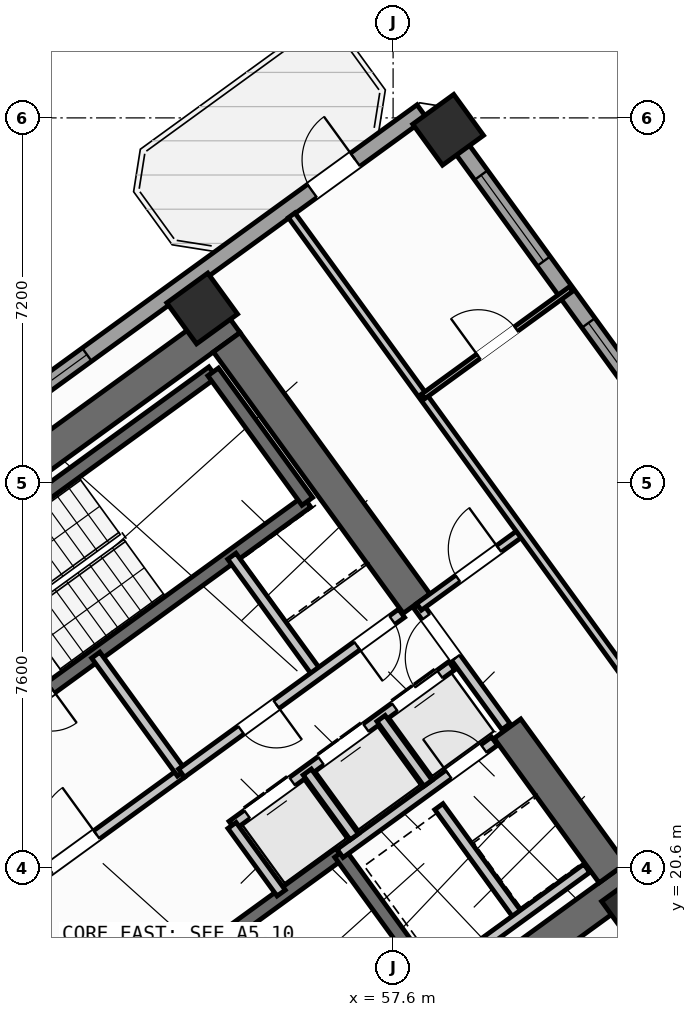
"""IFC4 building model, lengths in metres.
Left out: names, types, materials, properties, quantities, classifications, styles, units other than length and angle.
Written with IfcOpenShell. Run it as: python <this file> out.ifc"""

import sys

from ifc_helpers import new_model, si_unit, direction, frame, frame_2d, origin, origin_2d, place, context, subcontext, project, spatial, rectangle, hollow_rectangle, extrude, source, transform, mapped, element, fill, save


model = new_model("IFC4")
c1 = context("Model", 3, precision=1e-05, world=origin(), true_north=direction((0.0, 1.0)))
c2 = subcontext(c1, "Body", "Model", "MODEL_VIEW")
j1 = project(units=[si_unit("LENGTHUNIT", "METRE"), si_unit("PLANEANGLEUNIT", "RADIAN")], contexts=[c1])
p1 = place(None, origin())
s1 = spatial("IfcSite", under=j1, at=p1, CompositionType="ELEMENT")
p2 = place(p1, origin())
s2 = spatial("IfcBuilding", under=s1, at=p2, CompositionType="ELEMENT")
p3 = place(p2, frame((0.0, 0.0, 49.2)))
s3 = spatial("IfcBuildingStorey", under=s2, at=p3, CompositionType="ELEMENT", Elevation=49.2)
p4 = place(p3, frame((52.318, 13.11, 0.0), z_axis=(0.0, 0.0, 1.0), x_axis=(0.809019445368, 0.587781878776, 0.0)))
e1 = element("IfcWall", 1, at=p4, inside=s3, PredefinedType="SHEAR", context=c2, shape_type="SweptSolid", body=[
    extrude(rectangle(XDim=12.44, YDim=0.65, at=frame_2d((6.22, 0.0))), origin(), (0.0, 0.0, 1.0), 3.35),
])
p5 = place(p3, frame((44.325, 24.113, 0.0), z_axis=(0.0, 0.0, 1.0), x_axis=(0.809012664862, 0.58779121131, 0.0)))
e2 = element("IfcWall", 2, at=p5, inside=s3, PredefinedType="SHEAR", context=c2, shape_type="SweptSolid", body=[
    extrude(rectangle(XDim=12.44, YDim=0.65, at=frame_2d((6.22, 0.0))), origin(), (0.0, 0.0, 1.0), 3.35),
])
p6 = place(p3, frame((61.929, 20.494, 0.0), z_axis=(0.0, 0.0, 1.0), x_axis=(-0.58782982593, 0.808984607855, 0.0)))
e3 = element("IfcWall", 3, at=p6, inside=s3, PredefinedType="SHEAR", context=c2, shape_type="SweptSolid", body=[
    extrude(rectangle(XDim=3.525, YDim=0.65, at=frame_2d((1.762, 0.0))), origin(), (0.0, 0.0, 1.0), 3.35),
])
p7 = place(p3, frame((58.064, 25.813, 0.0), z_axis=(0.0, 0.0, 1.0), x_axis=(-0.58777996584, 0.809020835181, 0.0)))
e4 = element("IfcWall", 4, at=p7, inside=s3, PredefinedType="SHEAR", context=c2, shape_type="SweptSolid", body=[
    extrude(rectangle(XDim=6.375, YDim=0.65, at=frame_2d((3.188, 0.0))), origin(), (0.0, 0.0, 1.0), 3.35),
])
m1 = source(origin(), c2, "Body", "SweptSolid", [
    extrude(hollow_rectangle(XDim=1.0, YDim=1.0, WallThickness=0.04, at=origin_2d()), origin(), (0.0, 0.0, 1.0), 3.6),
])
for number, where, z_axis, x_axis in (
    (5, (62.414, 19.827, 0.0), (0.0, 0.0, 1.0), (0.809, 0.588, 0.0)),
    (6, (53.832, 31.638, 0.0), (0.0, 0.0, 1.0), (0.809, 0.588, 0.0)),
    (7, (58.686, 35.165, 0.0), (0.0, 0.0, 1.0), (0.809, 0.588, 0.0)),
):
    element("IfcColumn", number, at=place(p3, frame(where, z_axis=z_axis, x_axis=x_axis)), inside=s3, PredefinedType="COLUMN", context=c2, shape_type="MappedRepresentation", body=[
        mapped(m1, transform((0.0, 0.0, 0.0), scale=1.0)),
    ])
p8 = place(p3, frame((43.938, 25.192, 0.0), z_axis=(0.0, 0.0, 1.0), x_axis=(0.809016324578, 0.587786174187, 0.0)))
e8 = element("IfcWall", 8, at=p8, inside=s3, PredefinedType="STANDARD", context=c2, shape_type="SweptSolid", body=[
    extrude(rectangle(XDim=17.587, YDim=0.32, at=frame_2d((8.794, 0.0))), origin(), (0.0, 0.0, 1.0), 3.35),
])
p9 = place(p8, frame((14.914, 0.0, 0.0)))
e9 = element("IfcOpeningElement", 9, at=p9, cuts=e8, PredefinedType="OPENING", context=c2, shape_type="SweptSolid", body=[
    extrude(rectangle(XDim=1.05, YDim=2.15, at=frame_2d((0.525, 1.075))), frame((0.0, 0.17, 0.0), z_axis=(0.0, -1.0, 0.0), x_axis=(1.0, 0.0, 0.0)), (0.0, 0.0, 1.0), 0.34),
])
p10 = place(p8, frame((2.169, 0.0, 0.8)))
e10 = element("IfcOpeningElement", 10, at=p10, cuts=e8, PredefinedType="OPENING", context=c2, shape_type="SweptSolid", body=[
    extrude(rectangle(XDim=2.1, YDim=1.55, at=frame_2d((1.05, 0.775))), frame((0.0, 0.17, 0.0), z_axis=(0.0, -1.0, 0.0), x_axis=(1.0, 0.0, 0.0)), (0.0, 0.0, 1.0), 0.34),
])
p11 = place(p8, frame((7.319, 0.0, 0.8)))
e11 = element("IfcOpeningElement", 11, at=p11, cuts=e8, PredefinedType="OPENING", context=c2, shape_type="SweptSolid", body=[
    extrude(rectangle(XDim=2.1, YDim=1.55, at=frame_2d((1.05, 0.775))), frame((0.0, 0.17, 0.0), z_axis=(0.0, -1.0, 0.0), x_axis=(1.0, 0.0, 0.0)), (0.0, 0.0, 1.0), 0.34),
])
p12 = place(p3, frame((58.455, 35.484, 0.0), z_axis=(0.0, 0.0, 1.0), x_axis=(0.587783625747, -0.809018176127, 0.0)))
e12 = element("IfcWall", 12, at=p12, inside=s3, PredefinedType="STANDARD", context=c2, shape_type="SweptSolid", body=[
    extrude(rectangle(XDim=21.587, YDim=0.32, at=frame_2d((10.794, 0.0))), origin(), (0.0, 0.0, 1.0), 2.725),
])
p13 = place(p12, frame((1.5, 0.0, 0.8)))
e13 = element("IfcOpeningElement", 13, at=p13, cuts=e12, PredefinedType="OPENING", context=c2, shape_type="SweptSolid", body=[
    extrude(rectangle(XDim=2.1, YDim=1.55, at=frame_2d((1.05, 0.775))), frame((0.0, 0.17, 0.0), z_axis=(0.0, -1.0, 0.0), x_axis=(1.0, 0.0, 0.0)), (0.0, 0.0, 1.0), 0.34),
])
p14 = place(p12, frame((5.105, 0.0, 0.85)))
e14 = element("IfcOpeningElement", 14, at=p14, cuts=e12, PredefinedType="OPENING", context=c2, shape_type="SweptSolid", body=[
    extrude(rectangle(XDim=1.5, YDim=1.5, at=frame_2d((0.75, 0.75))), frame((0.0, 0.17, 0.0), z_axis=(0.0, -1.0, 0.0), x_axis=(1.0, 0.0, 0.0)), (0.0, 0.0, 1.0), 0.34),
])
p15 = place(p12, frame((8.954, 0.0, 0.85)))
e15 = element("IfcOpeningElement", 15, at=p15, cuts=e12, PredefinedType="OPENING", context=c2, shape_type="SweptSolid", body=[
    extrude(rectangle(XDim=1.5, YDim=1.5, at=frame_2d((0.75, 0.75))), frame((0.0, 0.17, 0.0), z_axis=(0.0, -1.0, 0.0), x_axis=(1.0, 0.0, 0.0)), (0.0, 0.0, 1.0), 0.34),
])
p16 = place(p12, frame((17.581, 0.0, 0.95)))
e16 = element("IfcOpeningElement", 16, at=p16, cuts=e12, PredefinedType="OPENING", context=c2, shape_type="SweptSolid", body=[
    extrude(rectangle(XDim=1.2, YDim=1.4, at=frame_2d((0.6, 0.7))), frame((0.0, 0.17, 0.0), z_axis=(0.0, -1.0, 0.0), x_axis=(1.0, 0.0, 0.0)), (0.0, 0.0, 1.0), 0.34),
])
p17 = place(p3, frame((48.006, 25.996, 0.0), z_axis=(0.0, 0.0, 1.0), x_axis=(0.80901903764, 0.587782439969, 0.0)))
e17 = element("IfcWall", 17, at=p17, inside=s3, PredefinedType="SHEAR", context=c2, shape_type="SweptSolid", body=[
    extrude(rectangle(XDim=7.46, YDim=0.26, at=frame_2d((3.73, 0.0))), origin(), (0.0, 0.0, 1.0), 3.35),
])
p18 = place(p3, frame((49.863, 23.44, 0.0), z_axis=(0.0, 0.0, 1.0), x_axis=(0.809003474932, 0.587803859759, 0.0)))
e18 = element("IfcWall", 18, at=p18, inside=s3, PredefinedType="SHEAR", context=c2, shape_type="SweptSolid", body=[
    extrude(rectangle(XDim=7.46, YDim=0.26, at=frame_2d((3.73, 0.0))), origin(), (0.0, 0.0, 1.0), 3.35),
])
p19 = place(p18, frame((0.36, 0.0, 0.0)))
e19 = element("IfcOpeningElement", 19, at=p19, cuts=e18, PredefinedType="OPENING", context=c2, shape_type="SweptSolid", body=[
    extrude(rectangle(XDim=0.86, YDim=2.05, at=frame_2d((0.43, 1.025))), frame((0.0, 0.14, 0.0), z_axis=(0.0, -1.0, 0.0), x_axis=(1.0, 0.0, 0.0)), (0.0, 0.0, 1.0), 0.28),
])
p20 = place(p3, frame((55.906, 27.831, 0.0), z_axis=(0.0, 0.0, 1.0), x_axis=(-0.587804123638, 0.809003283204, 0.0)))
e20 = element("IfcWall", 20, at=p20, inside=s3, PredefinedType="SHEAR", context=c2, shape_type="SweptSolid", body=[
    extrude(rectangle(XDim=3.16, YDim=0.26, at=frame_2d((1.58, 0.0))), origin(), (0.0, 0.0, 1.0), 3.35),
])
p21 = place(p3, frame((50.615, 16.57, 0.0), z_axis=(0.0, 0.0, 1.0), x_axis=(0.809028366311, 0.587769599847, 0.0)))
e21 = element("IfcWall", 21, at=p21, inside=s3, PredefinedType="SHEAR", context=c2, shape_type="SweptSolid", body=[
    extrude(rectangle(XDim=7.33, YDim=0.26, at=frame_2d((3.665, 0.0))), origin(), (0.0, 0.0, 1.0), 3.35),
])
p22 = place(p21, frame((0.22, 0.0, 0.0)))
e22 = element("IfcOpeningElement", 22, at=p22, cuts=e21, PredefinedType="OPENING", context=c2, shape_type="SweptSolid", body=[
    extrude(rectangle(XDim=1.1, YDim=2.1, at=frame_2d((0.55, 1.05))), frame((0.0, 0.14, 0.0), z_axis=(0.0, -1.0, 0.0), x_axis=(1.0, 0.0, 0.0)), (0.0, 0.0, 1.0), 0.28),
])
p23 = place(p3, frame((58.41, 18.327, 0.0), z_axis=(0.0, 0.0, 1.0), x_axis=(-0.58776738483, 0.809029975545, 0.0)))
e23 = element("IfcWall", 23, at=p23, inside=s3, PredefinedType="SHEAR", context=c2, shape_type="SweptSolid", body=[
    extrude(rectangle(XDim=3.16, YDim=0.26, at=frame_2d((1.58, 0.0))), origin(), (0.0, 0.0, 1.0), 3.35),
])
p24 = place(p3, frame((48.799, 19.107, 0.0), z_axis=(0.0, 0.0, 1.0), x_axis=(0.809012959416, 0.587790805897, 0.0)))
e24 = element("IfcWall", 24, at=p24, inside=s3, PredefinedType="STANDARD", context=c2, shape_type="SweptSolid", body=[
    extrude(rectangle(XDim=5.718, YDim=0.2, at=frame_2d((2.859, 0.0))), origin(), (0.0, 0.0, 1.0), 3.34),
])
p25 = place(p24, frame((2.498, 0.0, 0.0)))
e25 = element("IfcOpeningElement", 25, at=p25, cuts=e24, PredefinedType="OPENING", context=c2, shape_type="SweptSolid", body=[
    extrude(rectangle(XDim=1.15, YDim=2.1, at=frame_2d((0.575, 1.05))), frame((0.0, 0.11, 0.0), z_axis=(0.0, -1.0, 0.0), x_axis=(1.0, 0.0, 0.0)), (0.0, 0.0, 1.0), 0.22),
])
p26 = place(p3, frame((56.553, 20.884, 0.0), z_axis=(0.0, 0.0, 1.0), x_axis=(0.809035789462, 0.587759382205, 0.0)))
e26 = element("IfcWall", 26, at=p26, inside=s3, PredefinedType="STANDARD", context=c2, shape_type="SweptSolid", body=[
    extrude(rectangle(XDim=3.768, YDim=0.2, at=frame_2d((1.884, 0.0))), origin(), (0.0, 0.0, 1.0), 3.34),
])
p27 = place(p26, frame((2.65, 0.0, 0.0)))
e27 = element("IfcOpeningElement", 27, at=p27, cuts=e26, PredefinedType="OPENING", context=c2, shape_type="SweptSolid", body=[
    extrude(rectangle(XDim=0.86, YDim=2.05, at=frame_2d((0.43, 1.025))), frame((0.0, 0.11, 0.0), z_axis=(0.0, -1.0, 0.0), x_axis=(1.0, 0.0, 0.0)), (0.0, 0.0, 1.0), 0.22),
])
p28 = place(p3, frame((54.421, 21.436, 0.0), z_axis=(0.0, 0.0, 1.0), x_axis=(0.809013710463, 0.587789772183, 0.0)))
e28 = element("IfcWall", 28, at=p28, inside=s3, PredefinedType="STANDARD", context=c2, shape_type="SweptSolid", body=[
    extrude(rectangle(XDim=5.36, YDim=0.2, at=frame_2d((2.68, 0.0))), origin(), (0.0, 0.0, 1.0), 3.34),
])
p29 = place(p28, frame((0.37, 0.0, 0.0)))
e29 = element("IfcOpeningElement", 29, at=p29, cuts=e28, PredefinedType="OPENING", context=c2, shape_type="SweptSolid", body=[
    extrude(rectangle(XDim=1.1, YDim=2.15, at=frame_2d((0.55, 1.075))), frame((0.0, 0.11, 0.0), z_axis=(0.0, -1.0, 0.0), x_axis=(1.0, 0.0, 0.0)), (0.0, 0.0, 1.0), 0.22),
])
p30 = place(p28, frame((2.17, 0.0, 0.0)))
e30 = element("IfcOpeningElement", 30, at=p30, cuts=e28, PredefinedType="OPENING", context=c2, shape_type="SweptSolid", body=[
    extrude(rectangle(XDim=1.1, YDim=2.15, at=frame_2d((0.55, 1.075))), frame((0.0, 0.11, 0.0), z_axis=(0.0, -1.0, 0.0), x_axis=(1.0, 0.0, 0.0)), (0.0, 0.0, 1.0), 0.22),
])
p31 = place(p28, frame((3.97, 0.0, 0.0)))
e31 = element("IfcOpeningElement", 31, at=p31, cuts=e28, PredefinedType="OPENING", context=c2, shape_type="SweptSolid", body=[
    extrude(rectangle(XDim=1.1, YDim=2.15, at=frame_2d((0.55, 1.075))), frame((0.0, 0.11, 0.0), z_axis=(0.0, -1.0, 0.0), x_axis=(1.0, 0.0, 0.0)), (0.0, 0.0, 1.0), 0.22),
])
p32 = place(p3, frame((55.391, 20.102, 0.0), z_axis=(0.0, 0.0, 1.0), x_axis=(-0.58778447739, 0.809017557374, 0.0)))
e32 = element("IfcWall", 32, at=p32, inside=s3, PredefinedType="STANDARD", context=c2, shape_type="SweptSolid", body=[
    extrude(rectangle(XDim=1.65, YDim=0.2, at=frame_2d((0.825, 0.0))), origin(), (0.0, 0.0, 1.0), 3.34),
])
p33 = place(p3, frame((56.834, 21.212, 0.0), z_axis=(0.0, 0.0, 1.0), x_axis=(-0.58776738483, 0.809029975545, 0.0)))
e33 = element("IfcWall", 33, at=p33, inside=s3, PredefinedType="STANDARD", context=c2, shape_type="SweptSolid", body=[
    extrude(rectangle(XDim=1.58, YDim=0.2, at=frame_2d((0.79, 0.0))), origin(), (0.0, 0.0, 1.0), 3.34),
])
p34 = place(p3, frame((58.29, 22.27, 0.0), z_axis=(0.0, 0.0, 1.0), x_axis=(-0.587840865826, 0.808976585857, 0.0)))
e34 = element("IfcWall", 34, at=p34, inside=s3, PredefinedType="STANDARD", context=c2, shape_type="SweptSolid", body=[
    extrude(rectangle(XDim=1.58, YDim=0.2, at=frame_2d((0.79, 0.0))), origin(), (0.0, 0.0, 1.0), 3.34),
])
p35 = place(p3, frame((60.067, 19.655, 0.0), z_axis=(0.0, 0.0, 1.0), x_axis=(-0.587800520745, 0.809005900975, 0.0)))
e35 = element("IfcWall", 35, at=p35, inside=s3, PredefinedType="STANDARD", context=c2, shape_type="SweptSolid", body=[
    extrude(rectangle(XDim=2.66, YDim=0.2, at=frame_2d((1.33, 0.0))), origin(), (0.0, 0.0, 1.0), 3.34),
])
p36 = place(p3, frame((58.472, 18.447, 0.0), z_axis=(0.0, 0.0, 1.0), x_axis=(0.809022487728, 0.587777691266, 0.0)))
e36 = element("IfcWall", 36, at=p36, inside=s3, PredefinedType="STANDARD", context=c2, shape_type="SweptSolid", body=[
    extrude(rectangle(XDim=3.648, YDim=0.2, at=frame_2d((1.824, 0.0))), origin(), (0.0, 0.0, 1.0), 3.34),
])
p37 = place(p3, frame((53.425, 22.468, 0.0), z_axis=(0.0, 0.0, 1.0), x_axis=(-0.5877230039, 0.809062216821, 0.0)))
e37 = element("IfcWall", 37, at=p37, inside=s3, PredefinedType="STANDARD", context=c2, shape_type="SweptSolid", body=[
    extrude(rectangle(XDim=2.88, YDim=0.2, at=frame_2d((1.44, 0.0))), origin(), (0.0, 0.0, 1.0), 3.34),
])
p38 = place(p3, frame((56.111, 24.419, 0.0), z_axis=(0.0, 0.0, 1.0), x_axis=(-0.58777848983, 0.809021907548, 0.0)))
e38 = element("IfcWall", 38, at=p38, inside=s3, PredefinedType="STANDARD", context=c2, shape_type="SweptSolid", body=[
    extrude(rectangle(XDim=2.88, YDim=0.2, at=frame_2d((1.44, 0.0))), origin(), (0.0, 0.0, 1.0), 3.34),
])
p39 = place(p3, frame((53.425, 22.468, 0.0), z_axis=(0.0, 0.0, 1.0), x_axis=(0.80902705128, 0.587771409902, 0.0)))
e39 = element("IfcWall", 39, at=p39, inside=s3, PredefinedType="STANDARD", context=c2, shape_type="SweptSolid", body=[
    extrude(rectangle(XDim=5.368, YDim=0.2, at=frame_2d((2.684, 0.0))), origin(), (0.0, 0.0, 1.0), 3.34),
])
p40 = place(p39, frame((4.28, 0.0, 0.0)))
e40 = element("IfcOpeningElement", 40, at=p40, cuts=e39, PredefinedType="OPENING", context=c2, shape_type="SweptSolid", body=[
    extrude(rectangle(XDim=0.86, YDim=2.05, at=frame_2d((0.43, 1.025))), frame((0.0, 0.11, 0.0), z_axis=(0.0, -1.0, 0.0), x_axis=(1.0, 0.0, 0.0)), (0.0, 0.0, 1.0), 0.22),
])
p41 = place(p39, frame((1.45, 0.0, 0.0)))
e41 = element("IfcOpeningElement", 41, at=p41, cuts=e39, PredefinedType="OPENING", context=c2, shape_type="SweptSolid", body=[
    extrude(rectangle(XDim=0.86, YDim=2.05, at=frame_2d((0.43, 1.025))), frame((0.0, 0.11, 0.0), z_axis=(0.0, -1.0, 0.0), x_axis=(1.0, 0.0, 0.0)), (0.0, 0.0, 1.0), 0.22),
])
p42 = place(p3, frame((59.827, 23.386, 0.0), z_axis=(0.0, 0.0, 1.0), x_axis=(-0.587803840107, 0.809003489211, 0.0)))
e42 = element("IfcWall", 42, at=p42, inside=s3, PredefinedType="STANDARD", context=c2, shape_type="SweptSolid", body=[
    extrude(rectangle(XDim=2.96, YDim=0.2, at=frame_2d((1.48, 0.0))), origin(), (0.0, 0.0, 1.0), 3.34),
])
p43 = place(p42, frame((1.68, 0.0, 0.0)))
e43 = element("IfcOpeningElement", 43, at=p43, cuts=e42, PredefinedType="OPENING", context=c2, shape_type="SweptSolid", body=[
    extrude(rectangle(XDim=1.0, YDim=2.1, at=frame_2d((0.5, 1.05))), frame((0.0, 0.11, 0.0), z_axis=(0.0, -1.0, 0.0), x_axis=(1.0, 0.0, 0.0)), (0.0, 0.0, 1.0), 0.22),
])
p44 = place(p3, frame((58.111, 25.749, 0.0), z_axis=(0.0, 0.0, 1.0), x_axis=(0.809000999347, 0.58780726693, 0.0)))
e44 = element("IfcWall", 44, at=p44, inside=s3, PredefinedType="PARTITIONING", context=c2, shape_type="SweptSolid", body=[
    extrude(rectangle(XDim=2.51, YDim=0.16, at=frame_2d((1.255, 0.0))), origin(), (0.0, 0.0, 1.0), 2.725),
])
p45 = place(p44, frame((0.95, 0.0, 0.0)))
e45 = element("IfcOpeningElement", 45, at=p45, cuts=e44, PredefinedType="OPENING", context=c2, shape_type="SweptSolid", body=[
    extrude(rectangle(XDim=1.0, YDim=2.1, at=frame_2d((0.5, 1.05))), frame((0.0, 0.09, 0.0), z_axis=(0.0, -1.0, 0.0), x_axis=(1.0, 0.0, 0.0)), (0.0, 0.0, 1.0), 0.18),
])
p46 = place(p3, frame((62.328, 24.215, 0.0), z_axis=(0.0, 0.0, 1.0), x_axis=(-0.587778600963, 0.809021826807, 0.0)))
e46 = element("IfcWall", 46, at=p46, inside=s3, PredefinedType="PARTITIONING", context=c2, shape_type="SweptSolid", body=[
    extrude(rectangle(XDim=11.45, YDim=0.16, at=frame_2d((5.725, 0.0))), origin(), (0.0, 0.0, 1.0), 3.34),
])
p47 = place(p3, frame((58.195, 29.904, 0.0), z_axis=(0.0, 0.0, 1.0), x_axis=(0.809005039917, 0.58780170584, 0.0)))
e47 = element("IfcWall", 47, at=p47, inside=s3, PredefinedType="PARTITIONING", context=c2, shape_type="SweptSolid", body=[
    extrude(rectangle(XDim=3.61, YDim=0.11, at=frame_2d((1.805, 0.0))), origin(), (0.0, 0.0, 1.0), 3.34),
])
p48 = place(p47, frame((1.345, 0.0, 0.0)))
e48 = element("IfcOpeningElement", 48, at=p48, cuts=e47, PredefinedType="OPENING", context=c2, shape_type="SweptSolid", body=[
    extrude(rectangle(XDim=0.92, YDim=2.08, at=frame_2d((0.46, 1.04))), frame((0.0, 0.065, 0.0), z_axis=(0.0, -1.0, 0.0), x_axis=(1.0, 0.0, 0.0)), (0.0, 0.0, 1.0), 0.13),
])
p49 = place(p3, frame((53.705, 11.126, 0.0), z_axis=(0.0, 0.0, 1.0), x_axis=(0.809014504436, 0.587788679384, 0.0)))
e49 = element("IfcWall", 49, at=p49, inside=s3, PredefinedType="PARTITIONING", context=c2, shape_type="SweptSolid", body=[
    extrude(rectangle(XDim=14.67, YDim=0.16, at=frame_2d((7.335, 0.0))), origin(), (0.0, 0.0, 1.0), 3.34),
])
p50 = place(p49, frame((10.2, 0.0, 0.0)))
e50 = element("IfcOpeningElement", 50, at=p50, cuts=e49, PredefinedType="OPENING", context=c2, shape_type="SweptSolid", body=[
    extrude(rectangle(XDim=1.0, YDim=2.1, at=frame_2d((0.5, 1.05))), frame((0.0, 0.09, 0.0), z_axis=(0.0, -1.0, 0.0), x_axis=(1.0, 0.0, 0.0)), (0.0, 0.0, 1.0), 0.18),
])
m2 = source(origin(), c2, "Body", "SweptSolid", [
    extrude(rectangle(XDim=1.05, YDim=2.15, at=frame_2d((0.525, 1.075))), frame((0.0, 0.025, 0.0), z_axis=(0.0, -1.0, 0.0), x_axis=(1.0, 0.0, 0.0)), (0.0, 0.0, 1.0), 0.05),
])
p51 = place(p9, origin())
e51 = element("IfcDoor", 51, at=p51, inside=s3, OperationType="SINGLE_SWING_RIGHT", PredefinedType="DOOR", context=c2, shape_type="MappedRepresentation", body=[
    mapped(m2, transform((0.0, 0.0, 0.0), scale=1.0)),
])
fill(e9, e51)
m3 = source(origin(), c2, "Body", "SweptSolid", [
    extrude(rectangle(XDim=2.1, YDim=1.55, at=frame_2d((1.05, 0.775))), frame((0.0, 0.03, 0.0), z_axis=(0.0, -1.0, 0.0), x_axis=(1.0, 0.0, 0.0)), (0.0, 0.0, 1.0), 0.06),
])
p52 = place(p11, origin())
e52 = element("IfcWindow", 52, at=p52, inside=s3, PartitioningType="SINGLE_PANEL", PredefinedType="WINDOW", context=c2, shape_type="MappedRepresentation", body=[
    mapped(m3, transform((0.0, 0.0, 0.0), scale=1.0)),
])
fill(e11, e52)
p53 = place(p13, origin())
e53 = element("IfcWindow", 53, at=p53, inside=s3, PartitioningType="SINGLE_PANEL", PredefinedType="WINDOW", context=c2, shape_type="MappedRepresentation", body=[
    mapped(m3, transform((0.0, 0.0, 0.0), scale=1.0)),
])
fill(e13, e53)
m4 = source(origin(), c2, "Body", "SweptSolid", [
    extrude(rectangle(XDim=1.5, YDim=1.5, at=frame_2d((0.75, 0.75))), frame((0.0, 0.03, 0.0), z_axis=(0.0, -1.0, 0.0), x_axis=(1.0, 0.0, 0.0)), (0.0, 0.0, 1.0), 0.06),
])
p54 = place(p14, origin())
e54 = element("IfcWindow", 54, at=p54, inside=s3, PartitioningType="SINGLE_PANEL", PredefinedType="WINDOW", context=c2, shape_type="MappedRepresentation", body=[
    mapped(m4, transform((0.0, 0.0, 0.0), scale=1.0)),
])
fill(e14, e54)
m5 = source(origin(), c2, "Body", "SweptSolid", [
    extrude(rectangle(XDim=1.15, YDim=2.1, at=frame_2d((0.575, 1.05))), frame((0.0, 0.025, 0.0), z_axis=(0.0, -1.0, 0.0), x_axis=(1.0, 0.0, 0.0)), (0.0, 0.0, 1.0), 0.05),
])
p55 = place(p25, origin())
e55 = element("IfcDoor", 55, at=p55, inside=s3, OperationType="SINGLE_SWING_RIGHT", PredefinedType="DOOR", context=c2, shape_type="MappedRepresentation", body=[
    mapped(m5, transform((0.0, 0.0, 0.0), scale=1.0)),
])
fill(e25, e55)
m6 = source(origin(), c2, "Body", "SweptSolid", [
    extrude(rectangle(XDim=1.1, YDim=2.15, at=frame_2d((0.55, 1.075))), frame((0.0, 0.025, 0.0), z_axis=(0.0, -1.0, 0.0), x_axis=(1.0, 0.0, 0.0)), (0.0, 0.0, 1.0), 0.05),
])
p56 = place(p29, origin())
e56 = element("IfcDoor", 56, at=p56, inside=s3, OperationType="DOUBLE_DOOR_SLIDING", PredefinedType="DOOR", context=c2, shape_type="MappedRepresentation", body=[
    mapped(m6, transform((0.0, 0.0, 0.0), scale=1.0)),
])
fill(e29, e56)
p57 = place(p30, origin())
e57 = element("IfcDoor", 57, at=p57, inside=s3, OperationType="DOUBLE_DOOR_SLIDING", PredefinedType="DOOR", context=c2, shape_type="MappedRepresentation", body=[
    mapped(m6, transform((0.0, 0.0, 0.0), scale=1.0)),
])
fill(e30, e57)
p58 = place(p31, origin())
e58 = element("IfcDoor", 58, at=p58, inside=s3, OperationType="DOUBLE_DOOR_SLIDING", PredefinedType="DOOR", context=c2, shape_type="MappedRepresentation", body=[
    mapped(m6, transform((0.0, 0.0, 0.0), scale=1.0)),
])
fill(e31, e58)
m7 = source(origin(), c2, "Body", "SweptSolid", [
    extrude(rectangle(XDim=0.86, YDim=2.05, at=frame_2d((0.43, 1.025))), frame((0.0, 0.025, 0.0), z_axis=(0.0, -1.0, 0.0), x_axis=(1.0, 0.0, 0.0)), (0.0, 0.0, 1.0), 0.05),
])
p59 = place(p27, origin())
e59 = element("IfcDoor", 59, at=p59, inside=s3, OperationType="SINGLE_SWING_LEFT", PredefinedType="DOOR", context=c2, shape_type="MappedRepresentation", body=[
    mapped(m7, transform((0.0, 0.0, 0.0), scale=1.0)),
])
fill(e27, e59)
p60 = place(p40, frame((0.86, 0.0, 0.0), z_axis=(0.0, 0.0, 1.0), x_axis=(-1.0, 0.0, 0.0)))
e60 = element("IfcDoor", 60, at=p60, inside=s3, OperationType="SINGLE_SWING_RIGHT", PredefinedType="DOOR", context=c2, shape_type="MappedRepresentation", body=[
    mapped(m7, transform((0.0, 0.0, 0.0), scale=1.0)),
])
fill(e40, e60)
p61 = place(p41, frame((0.86, 0.0, 0.0), z_axis=(0.0, 0.0, 1.0), x_axis=(-1.0, 0.0, 0.0)))
e61 = element("IfcDoor", 61, at=p61, inside=s3, OperationType="SINGLE_SWING_LEFT", PredefinedType="DOOR", context=c2, shape_type="MappedRepresentation", body=[
    mapped(m7, transform((0.0, 0.0, 0.0), scale=1.0)),
])
fill(e41, e61)
m8 = source(origin(), c2, "Body", "SweptSolid", [
    extrude(rectangle(XDim=1.0, YDim=2.1, at=frame_2d((0.5, 1.05))), frame((0.0, 0.025, 0.0), z_axis=(0.0, -1.0, 0.0), x_axis=(1.0, 0.0, 0.0)), (0.0, 0.0, 1.0), 0.05),
])
p62 = place(p45, origin())
e62 = element("IfcDoor", 62, at=p62, inside=s3, OperationType="SINGLE_SWING_RIGHT", PredefinedType="DOOR", context=c2, shape_type="MappedRepresentation", body=[
    mapped(m8, transform((0.0, 0.0, 0.0), scale=1.0)),
])
fill(e45, e62)
p63 = place(p43, origin())
e63 = element("IfcDoor", 63, at=p63, inside=s3, OperationType="SINGLE_SWING_LEFT", PredefinedType="DOOR", context=c2, shape_type="MappedRepresentation", body=[
    mapped(m8, transform((0.0, 0.0, 0.0), scale=1.0)),
])
fill(e43, e63)
m9 = source(origin(), c2, "Body", "SweptSolid", [
    extrude(rectangle(XDim=0.92, YDim=2.08, at=frame_2d((0.46, 1.04))), frame((0.0, 0.025, 0.0), z_axis=(0.0, -1.0, 0.0), x_axis=(1.0, 0.0, 0.0)), (0.0, 0.0, 1.0), 0.05),
])
p64 = place(p48, origin())
e64 = element("IfcDoor", 64, at=p64, inside=s3, OperationType="SINGLE_SWING_LEFT", PredefinedType="DOOR", context=c2, shape_type="MappedRepresentation", body=[
    mapped(m9, transform((0.0, 0.0, 0.0), scale=1.0)),
])
fill(e48, e64)
save(model, sys.argv[1])
